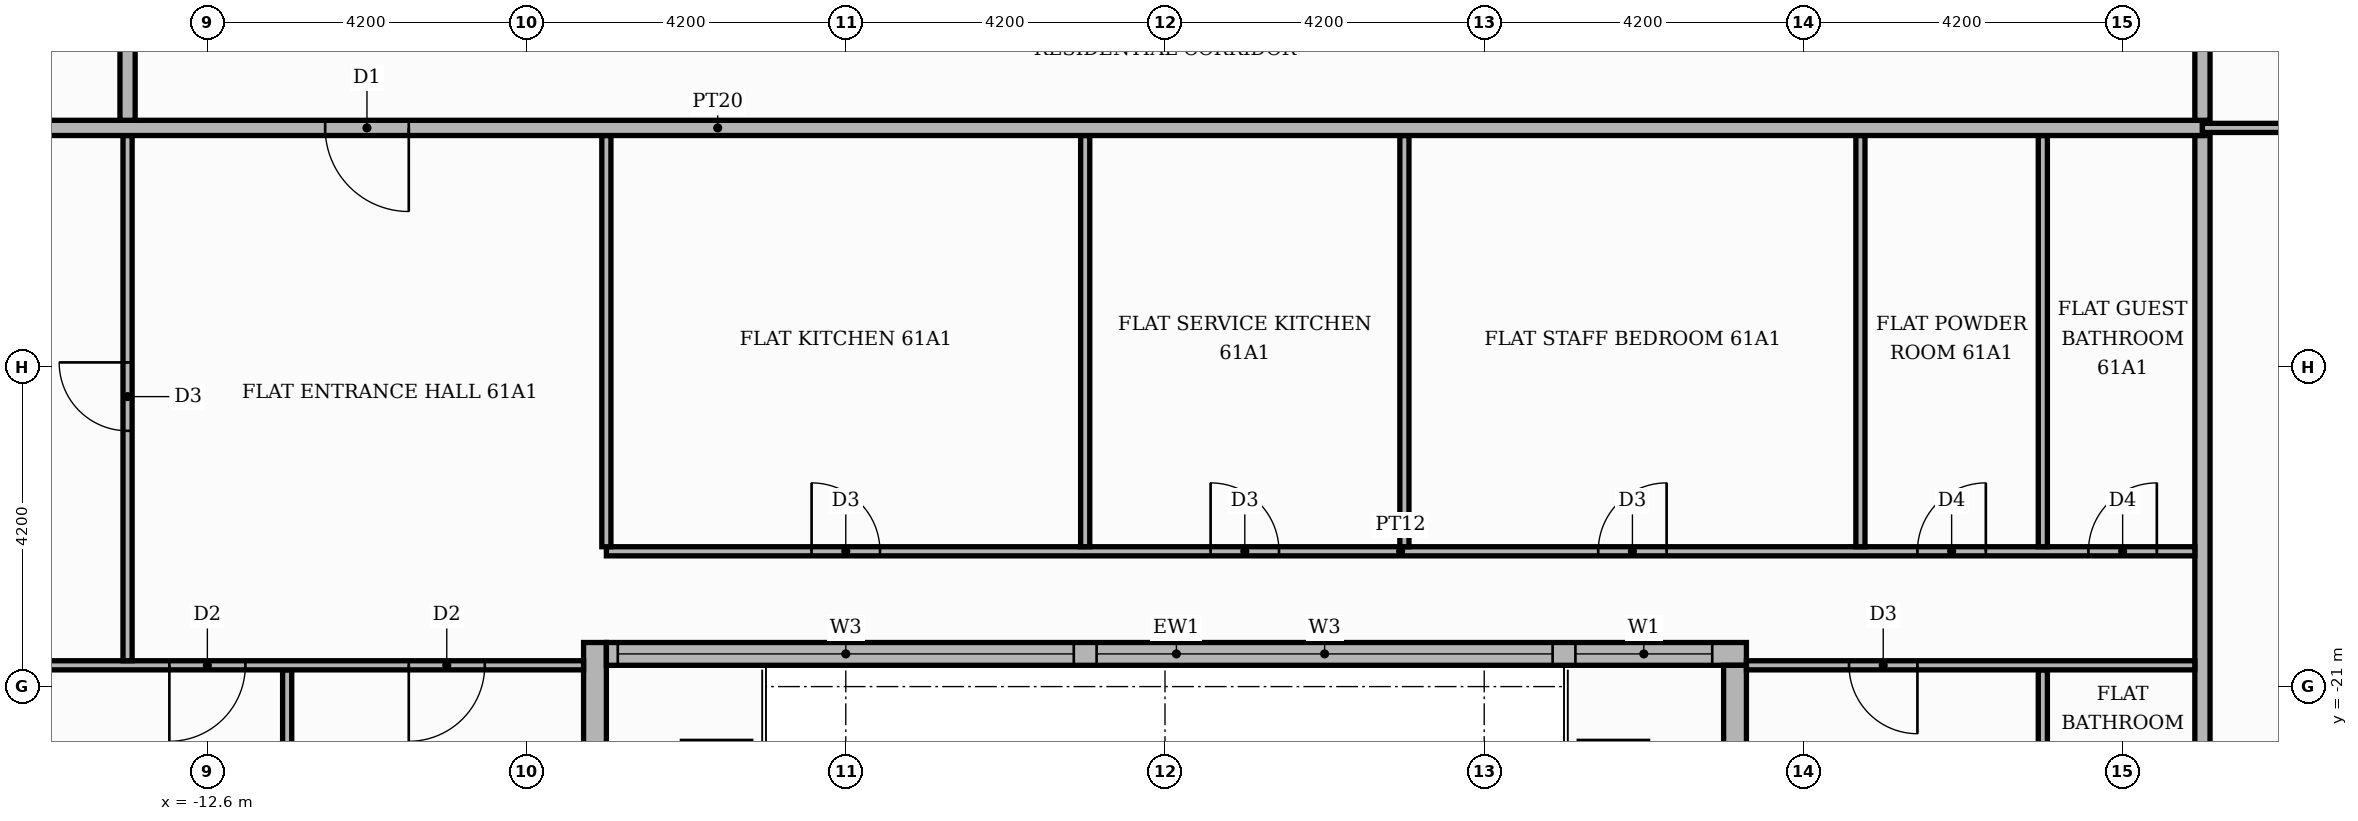
"""IFC4 building model, lengths in metres.
Left out: names, types, materials, properties, quantities, classifications, styles, units other than length and angle.
Written with IfcOpenShell. Run it as: python <this file> out.ifc"""

import sys

from ifc_helpers import new_model, si_unit, direction, frame, frame_2d, origin, place, context, subcontext, project, spatial, rectangle, extrude, element, fill, save


model = new_model("IFC4")
c1 = context("Model", 3, precision=1e-05, world=origin(), true_north=direction((0.0, 1.0)))
c2 = subcontext(c1, "Body", "Model", "MODEL_VIEW")
j1 = project(units=[si_unit("LENGTHUNIT", "METRE"), si_unit("PLANEANGLEUNIT", "RADIAN")], contexts=[c1])
p1 = place(None, origin())
s1 = spatial("IfcSite", under=j1, at=p1, CompositionType="ELEMENT")
p2 = place(p1, origin())
s2 = spatial("IfcBuilding", under=s1, at=p2, CompositionType="ELEMENT")
p3 = place(p2, frame((0.0, 0.0, 256.2)))
s3 = spatial("IfcBuildingStorey", under=s2, at=p3, CompositionType="ELEMENT", Elevation=256.2)
p4 = place(p3, frame((-7.5, -25.42, 0.0), z_axis=(0.0, 0.0, 1.0), x_axis=(0.0, 1.0, 0.0)))
e1 = element("IfcWall", 1, at=p4, inside=s3, PredefinedType="STANDARD", context=c2, shape_type="SweptSolid", body=[
    extrude(rectangle(XDim=5.0, YDim=0.3, at=frame_2d((2.5, 0.0))), origin(), (0.0, 0.0, 1.0), 3.48),
])
p5 = place(p4, frame((1.42, 0.0, 0.0)))
e2 = element("IfcOpeningElement", 2, at=p5, cuts=e1, PredefinedType="OPENING", context=c2, shape_type="SweptSolid", body=[
    extrude(rectangle(XDim=1.8, YDim=2.4, at=frame_2d((0.9, 1.2))), frame((0.0, 0.16, 0.0), z_axis=(0.0, -1.0, 0.0), x_axis=(1.0, 0.0, 0.0)), (0.0, 0.0, 1.0), 0.32),
])
p6 = place(p3, frame((-7.35, -20.57, 0.0), z_axis=(0.0, 0.0, 1.0), x_axis=(1.0, 0.0, 0.0)))
e3 = element("IfcWall", 3, at=p6, inside=s3, PredefinedType="STANDARD", context=c2, shape_type="SweptSolid", body=[
    extrude(rectangle(XDim=15.0, YDim=0.3, at=frame_2d((7.5, 0.0))), origin(), (0.0, 0.0, 1.0), 3.48),
])
p7 = place(p6, frame((0.15, 0.0, 0.9)))
e4 = element("IfcOpeningElement", 4, at=p7, cuts=e3, PredefinedType="OPENING", context=c2, shape_type="SweptSolid", body=[
    extrude(rectangle(XDim=6.0, YDim=2.1, at=frame_2d((3.0, 1.05))), frame((0.0, 0.16, 0.0), z_axis=(0.0, -1.0, 0.0), x_axis=(1.0, 0.0, 0.0)), (0.0, 0.0, 1.0), 0.32),
])
p8 = place(p6, frame((6.45, 0.0, 0.9)))
e5 = element("IfcOpeningElement", 5, at=p8, cuts=e3, PredefinedType="OPENING", context=c2, shape_type="SweptSolid", body=[
    extrude(rectangle(XDim=6.0, YDim=2.1, at=frame_2d((3.0, 1.05))), frame((0.0, 0.16, 0.0), z_axis=(0.0, -1.0, 0.0), x_axis=(1.0, 0.0, 0.0)), (0.0, 0.0, 1.0), 0.32),
])
p9 = place(p6, frame((12.75, 0.0, 0.9)))
e6 = element("IfcOpeningElement", 6, at=p9, cuts=e3, PredefinedType="OPENING", context=c2, shape_type="SweptSolid", body=[
    extrude(rectangle(XDim=1.8, YDim=2.1, at=frame_2d((0.9, 1.05))), frame((0.0, 0.16, 0.0), z_axis=(0.0, -1.0, 0.0), x_axis=(1.0, 0.0, 0.0)), (0.0, 0.0, 1.0), 0.32),
])
p10 = place(p3, frame((7.5, -20.72, 0.0), z_axis=(0.0, 0.0, 1.0), x_axis=(0.0, -1.0, 0.0)))
e7 = element("IfcWall", 7, at=p10, inside=s3, PredefinedType="STANDARD", context=c2, shape_type="SweptSolid", body=[
    extrude(rectangle(XDim=5.0, YDim=0.3, at=frame_2d((2.5, 0.0))), origin(), (0.0, 0.0, 1.0), 3.48),
])
p11 = place(p10, frame((1.48, 0.0, 0.0)))
e8 = element("IfcOpeningElement", 8, at=p11, cuts=e7, PredefinedType="OPENING", context=c2, shape_type="SweptSolid", body=[
    extrude(rectangle(XDim=1.8, YDim=2.4, at=frame_2d((0.9, 1.2))), frame((0.0, 0.16, 0.0), z_axis=(0.0, -1.0, 0.0), x_axis=(1.0, 0.0, 0.0)), (0.0, 0.0, 1.0), 0.32),
])
p12 = place(p3, frame((-11.55, -25.42, 0.0), z_axis=(0.0, 0.0, 1.0), x_axis=(0.0, 1.0, 0.0)))
e9 = element("IfcWall", 9, at=p12, inside=s3, PredefinedType="PARTITIONING", context=c2, shape_type="SweptSolid", body=[
    extrude(rectangle(XDim=4.64, YDim=0.12, at=frame_2d((2.32, 0.0))), origin(), (0.0, 0.0, 1.0), 3.48),
])
p13 = place(p3, frame((11.55, -25.42, 0.0), z_axis=(0.0, 0.0, 1.0), x_axis=(0.0, 1.0, 0.0)))
e10 = element("IfcWall", 10, at=p13, inside=s3, PredefinedType="PARTITIONING", context=c2, shape_type="SweptSolid", body=[
    extrude(rectangle(XDim=4.64, YDim=0.12, at=frame_2d((2.32, 0.0))), origin(), (0.0, 0.0, 1.0), 3.48),
])
p14 = place(p13, frame((1.75, 0.0, 0.0)))
e11 = element("IfcOpeningElement", 11, at=p14, cuts=e10, PredefinedType="OPENING", context=c2, shape_type="SweptSolid", body=[
    extrude(rectangle(XDim=0.9, YDim=2.1, at=frame_2d((0.45, 1.05))), frame((0.0, 0.07, 0.0), z_axis=(0.0, -1.0, 0.0), x_axis=(1.0, 0.0, 0.0)), (0.0, 0.0, 1.0), 0.14),
])
p15 = place(p3, frame((13.65, -25.42, 0.0), z_axis=(0.0, 0.0, 1.0), x_axis=(0.0, 1.0, 0.0)))
e12 = element("IfcWall", 12, at=p15, inside=s3, PredefinedType="PARTITIONING", context=c2, shape_type="SweptSolid", body=[
    extrude(rectangle(XDim=11.67, YDim=0.2, at=frame_2d((5.835, 0.0))), origin(), (0.0, 0.0, 1.0), 3.48),
])
p16 = place(p3, frame((-20.42, -20.72, 0.0), z_axis=(0.0, 0.0, 1.0), x_axis=(1.0, 0.0, 0.0)))
e13 = element("IfcWall", 13, at=p16, inside=s3, PredefinedType="PARTITIONING", context=c2, shape_type="SweptSolid", body=[
    extrude(rectangle(XDim=12.77, YDim=0.12, at=frame_2d((6.385, 0.0))), origin(), (0.0, 0.0, 1.0), 3.48),
])
p17 = place(p16, frame((7.32, 0.0, 0.0)))
e14 = element("IfcOpeningElement", 14, at=p17, cuts=e13, PredefinedType="OPENING", context=c2, shape_type="SweptSolid", body=[
    extrude(rectangle(XDim=1.0, YDim=2.1, at=frame_2d((0.5, 1.05))), frame((0.0, 0.07, 0.0), z_axis=(0.0, -1.0, 0.0), x_axis=(1.0, 0.0, 0.0)), (0.0, 0.0, 1.0), 0.14),
])
p18 = place(p16, frame((10.47, 0.0, 0.0)))
e15 = element("IfcOpeningElement", 15, at=p18, cuts=e13, PredefinedType="OPENING", context=c2, shape_type="SweptSolid", body=[
    extrude(rectangle(XDim=1.0, YDim=2.1, at=frame_2d((0.5, 1.05))), frame((0.0, 0.07, 0.0), z_axis=(0.0, -1.0, 0.0), x_axis=(1.0, 0.0, 0.0)), (0.0, 0.0, 1.0), 0.14),
])
p19 = place(p3, frame((7.65, -20.72, 0.0), z_axis=(0.0, 0.0, 1.0), x_axis=(1.0, 0.0, 0.0)))
e16 = element("IfcWall", 16, at=p19, inside=s3, PredefinedType="PARTITIONING", context=c2, shape_type="SweptSolid", body=[
    extrude(rectangle(XDim=5.9, YDim=0.12, at=frame_2d((2.95, 0.0))), origin(), (0.0, 0.0, 1.0), 3.48),
])
p20 = place(p19, frame((1.35, 0.0, 0.0)))
e17 = element("IfcOpeningElement", 17, at=p20, cuts=e16, PredefinedType="OPENING", context=c2, shape_type="SweptSolid", body=[
    extrude(rectangle(XDim=0.9, YDim=2.1, at=frame_2d((0.45, 1.05))), frame((0.0, 0.07, 0.0), z_axis=(0.0, -1.0, 0.0), x_axis=(1.0, 0.0, 0.0)), (0.0, 0.0, 1.0), 0.14),
])
p21 = place(p3, frame((-13.65, -20.66, 0.0), z_axis=(0.0, 0.0, 1.0), x_axis=(0.0, 1.0, 0.0)))
e18 = element("IfcWall", 18, at=p21, inside=s3, PredefinedType="PARTITIONING", context=c2, shape_type="SweptSolid", body=[
    extrude(rectangle(XDim=6.91, YDim=0.12, at=frame_2d((3.455, 0.0))), origin(), (0.0, 0.0, 1.0), 3.48),
])
p22 = place(p21, frame((3.025, 0.0, 0.0)))
e19 = element("IfcOpeningElement", 19, at=p22, cuts=e18, PredefinedType="OPENING", context=c2, shape_type="SweptSolid", body=[
    extrude(rectangle(XDim=0.9, YDim=2.1, at=frame_2d((0.45, 1.05))), frame((0.0, 0.07, 0.0), z_axis=(0.0, -1.0, 0.0), x_axis=(1.0, 0.0, 0.0)), (0.0, 0.0, 1.0), 0.14),
])
p23 = place(p3, frame((-7.35, -19.22, 0.0), z_axis=(0.0, 0.0, 1.0), x_axis=(1.0, 0.0, 0.0)))
e20 = element("IfcWall", 20, at=p23, inside=s3, PredefinedType="PARTITIONING", context=c2, shape_type="SweptSolid", body=[
    extrude(rectangle(XDim=20.9, YDim=0.12, at=frame_2d((10.45, 0.0))), origin(), (0.0, 0.0, 1.0), 3.48),
])
p24 = place(p23, frame((2.7, 0.0, 0.0)))
e21 = element("IfcOpeningElement", 21, at=p24, cuts=e20, PredefinedType="OPENING", context=c2, shape_type="SweptSolid", body=[
    extrude(rectangle(XDim=0.9, YDim=2.1, at=frame_2d((0.45, 1.05))), frame((0.0, 0.07, 0.0), z_axis=(0.0, -1.0, 0.0), x_axis=(1.0, 0.0, 0.0)), (0.0, 0.0, 1.0), 0.14),
])
p25 = place(p23, frame((7.95, 0.0, 0.0)))
e22 = element("IfcOpeningElement", 22, at=p25, cuts=e20, PredefinedType="OPENING", context=c2, shape_type="SweptSolid", body=[
    extrude(rectangle(XDim=0.9, YDim=2.1, at=frame_2d((0.45, 1.05))), frame((0.0, 0.07, 0.0), z_axis=(0.0, -1.0, 0.0), x_axis=(1.0, 0.0, 0.0)), (0.0, 0.0, 1.0), 0.14),
])
p26 = place(p23, frame((13.05, 0.0, 0.0)))
e23 = element("IfcOpeningElement", 23, at=p26, cuts=e20, PredefinedType="OPENING", context=c2, shape_type="SweptSolid", body=[
    extrude(rectangle(XDim=0.9, YDim=2.1, at=frame_2d((0.45, 1.05))), frame((0.0, 0.07, 0.0), z_axis=(0.0, -1.0, 0.0), x_axis=(1.0, 0.0, 0.0)), (0.0, 0.0, 1.0), 0.14),
])
p27 = place(p23, frame((17.25, 0.0, 0.0)))
e24 = element("IfcOpeningElement", 24, at=p27, cuts=e20, PredefinedType="OPENING", context=c2, shape_type="SweptSolid", body=[
    extrude(rectangle(XDim=0.9, YDim=2.1, at=frame_2d((0.45, 1.05))), frame((0.0, 0.07, 0.0), z_axis=(0.0, -1.0, 0.0), x_axis=(1.0, 0.0, 0.0)), (0.0, 0.0, 1.0), 0.14),
])
p28 = place(p23, frame((19.5, 0.0, 0.0)))
e25 = element("IfcOpeningElement", 25, at=p28, cuts=e20, PredefinedType="OPENING", context=c2, shape_type="SweptSolid", body=[
    extrude(rectangle(XDim=0.9, YDim=2.1, at=frame_2d((0.45, 1.05))), frame((0.0, 0.07, 0.0), z_axis=(0.0, -1.0, 0.0), x_axis=(1.0, 0.0, 0.0)), (0.0, 0.0, 1.0), 0.14),
])
for number, where, z_axis, x_axis in (
    (26, (-7.35, -19.16, 0.0), (0.0, 0.0, 1.0), (0.0, 1.0, 0.0)),
    (27, (-1.05, -19.16, 0.0), (0.0, 0.0, 1.0), (0.0, 1.0, 0.0)),
    (28, (3.15, -19.16, 0.0), (0.0, 0.0, 1.0), (0.0, 1.0, 0.0)),
    (29, (9.15, -19.16, 0.0), (0.0, 0.0, 1.0), (0.0, 1.0, 0.0)),
    (30, (11.55, -19.16, 0.0), (0.0, 0.0, 1.0), (0.0, 1.0, 0.0)),
):
    element("IfcWall", number, at=place(p3, frame(where, z_axis=z_axis, x_axis=x_axis)), inside=s3, PredefinedType="PARTITIONING", context=c2, shape_type="SweptSolid", body=[
        extrude(rectangle(XDim=5.41, YDim=0.12, at=frame_2d((2.705, 0.0))), origin(), (0.0, 0.0, 1.0), 3.48),
    ])
p29 = place(p3, frame((-25.42, -13.65, 0.0), z_axis=(0.0, 0.0, 1.0), x_axis=(1.0, 0.0, 0.0)))
e31 = element("IfcWall", 31, at=p29, inside=s3, PredefinedType="PARTITIONING", context=c2, shape_type="SweptSolid", body=[
    extrude(rectangle(XDim=39.07, YDim=0.2, at=frame_2d((19.535, 0.0))), origin(), (0.0, 0.0, 1.0), 3.48),
])
p30 = place(p29, frame((14.37, 0.0, 0.0)))
e32 = element("IfcOpeningElement", 32, at=p30, cuts=e31, PredefinedType="OPENING", context=c2, shape_type="SweptSolid", body=[
    extrude(rectangle(XDim=1.1, YDim=2.4, at=frame_2d((0.55, 1.2))), frame((0.0, 0.11, 0.0), z_axis=(0.0, -1.0, 0.0), x_axis=(1.0, 0.0, 0.0)), (0.0, 0.0, 1.0), 0.22),
])
p31 = place(p3, frame((13.65, -13.65, 0.0), z_axis=(0.0, 0.0, 1.0), x_axis=(1.0, 0.0, 0.0)))
e33 = element("IfcWall", 33, at=p31, inside=s3, PredefinedType="PARTITIONING", context=c2, shape_type="SweptSolid", body=[
    extrude(rectangle(XDim=6.47, YDim=0.12, at=frame_2d((3.235, 0.0))), origin(), (0.0, 0.0, 1.0), 3.48),
])
p32 = place(p31, frame((2.785, 0.0, 0.0)))
e34 = element("IfcOpeningElement", 34, at=p32, cuts=e33, PredefinedType="OPENING", context=c2, shape_type="SweptSolid", body=[
    extrude(rectangle(XDim=0.9, YDim=2.1, at=frame_2d((0.45, 1.05))), frame((0.0, 0.07, 0.0), z_axis=(0.0, -1.0, 0.0), x_axis=(1.0, 0.0, 0.0)), (0.0, 0.0, 1.0), 0.14),
])
for number, where, z_axis, x_axis in (
    (35, (-13.65, -13.55, 0.0), (0.0, 0.0, 1.0), (0.0, 1.0, 0.0)),
    (36, (13.65, -13.55, 0.0), (0.0, 0.0, 1.0), (0.0, 1.0, 0.0)),
):
    element("IfcWall", number, at=place(p3, frame(where, z_axis=z_axis, x_axis=x_axis)), inside=s3, PredefinedType="PARTITIONING", context=c2, shape_type="SweptSolid", body=[
        extrude(rectangle(XDim=2.45, YDim=0.2, at=frame_2d((1.225, 0.0))), origin(), (0.0, 0.0, 1.0), 3.48),
    ])
p33 = place(p7, origin())
e37 = element("IfcWindow", 37, at=p33, inside=s3, PartitioningType="SINGLE_PANEL", PredefinedType="WINDOW", context=c2, shape_type="SweptSolid", body=[
    extrude(rectangle(XDim=6.0, YDim=2.1, at=frame_2d((3.0, 1.05))), frame((0.0, 0.03, 0.0), z_axis=(0.0, -1.0, 0.0), x_axis=(1.0, 0.0, 0.0)), (0.0, 0.0, 1.0), 0.06),
])
fill(e4, e37)
p34 = place(p8, origin())
e38 = element("IfcWindow", 38, at=p34, inside=s3, PartitioningType="SINGLE_PANEL", PredefinedType="WINDOW", context=c2, shape_type="SweptSolid", body=[
    extrude(rectangle(XDim=6.0, YDim=2.1, at=frame_2d((3.0, 1.05))), frame((0.0, 0.03, 0.0), z_axis=(0.0, -1.0, 0.0), x_axis=(1.0, 0.0, 0.0)), (0.0, 0.0, 1.0), 0.06),
])
fill(e5, e38)
p35 = place(p9, origin())
e39 = element("IfcWindow", 39, at=p35, inside=s3, PartitioningType="SINGLE_PANEL", PredefinedType="WINDOW", context=c2, shape_type="SweptSolid", body=[
    extrude(rectangle(XDim=1.8, YDim=2.1, at=frame_2d((0.9, 1.05))), frame((0.0, 0.03, 0.0), z_axis=(0.0, -1.0, 0.0), x_axis=(1.0, 0.0, 0.0)), (0.0, 0.0, 1.0), 0.06),
])
fill(e6, e39)
p36 = place(p30, frame((1.1, 0.0, 0.0), z_axis=(0.0, 0.0, 1.0), x_axis=(-1.0, 0.0, 0.0)))
e40 = element("IfcDoor", 40, at=p36, inside=s3, OperationType="SINGLE_SWING_RIGHT", PredefinedType="DOOR", context=c2, shape_type="SweptSolid", body=[
    extrude(rectangle(XDim=1.1, YDim=2.4, at=frame_2d((0.55, 1.2))), frame((0.0, 0.025, 0.0), z_axis=(0.0, -1.0, 0.0), x_axis=(1.0, 0.0, 0.0)), (0.0, 0.0, 1.0), 0.05),
])
fill(e32, e40)
p37 = place(p22, origin())
e41 = element("IfcDoor", 41, at=p37, inside=s3, OperationType="SINGLE_SWING_RIGHT", PredefinedType="DOOR", context=c2, shape_type="SweptSolid", body=[
    extrude(rectangle(XDim=0.9, YDim=2.1, at=frame_2d((0.45, 1.05))), frame((0.0, 0.025, 0.0), z_axis=(0.0, -1.0, 0.0), x_axis=(1.0, 0.0, 0.0)), (0.0, 0.0, 1.0), 0.05),
])
fill(e19, e41)
p38 = place(p24, origin())
e42 = element("IfcDoor", 42, at=p38, inside=s3, OperationType="SINGLE_SWING_LEFT", PredefinedType="DOOR", context=c2, shape_type="SweptSolid", body=[
    extrude(rectangle(XDim=0.9, YDim=2.1, at=frame_2d((0.45, 1.05))), frame((0.0, 0.025, 0.0), z_axis=(0.0, -1.0, 0.0), x_axis=(1.0, 0.0, 0.0)), (0.0, 0.0, 1.0), 0.05),
])
fill(e21, e42)
p39 = place(p25, origin())
e43 = element("IfcDoor", 43, at=p39, inside=s3, OperationType="SINGLE_SWING_LEFT", PredefinedType="DOOR", context=c2, shape_type="SweptSolid", body=[
    extrude(rectangle(XDim=0.9, YDim=2.1, at=frame_2d((0.45, 1.05))), frame((0.0, 0.025, 0.0), z_axis=(0.0, -1.0, 0.0), x_axis=(1.0, 0.0, 0.0)), (0.0, 0.0, 1.0), 0.05),
])
fill(e22, e43)
p40 = place(p26, origin())
e44 = element("IfcDoor", 44, at=p40, inside=s3, OperationType="SINGLE_SWING_RIGHT", PredefinedType="DOOR", context=c2, shape_type="SweptSolid", body=[
    extrude(rectangle(XDim=0.9, YDim=2.1, at=frame_2d((0.45, 1.05))), frame((0.0, 0.025, 0.0), z_axis=(0.0, -1.0, 0.0), x_axis=(1.0, 0.0, 0.0)), (0.0, 0.0, 1.0), 0.05),
])
fill(e23, e44)
p41 = place(p27, origin())
e45 = element("IfcDoor", 45, at=p41, inside=s3, OperationType="SINGLE_SWING_RIGHT", PredefinedType="DOOR", context=c2, shape_type="SweptSolid", body=[
    extrude(rectangle(XDim=0.9, YDim=2.1, at=frame_2d((0.45, 1.05))), frame((0.0, 0.025, 0.0), z_axis=(0.0, -1.0, 0.0), x_axis=(1.0, 0.0, 0.0)), (0.0, 0.0, 1.0), 0.05),
])
fill(e24, e45)
p42 = place(p28, origin())
e46 = element("IfcDoor", 46, at=p42, inside=s3, OperationType="SINGLE_SWING_RIGHT", PredefinedType="DOOR", context=c2, shape_type="SweptSolid", body=[
    extrude(rectangle(XDim=0.9, YDim=2.1, at=frame_2d((0.45, 1.05))), frame((0.0, 0.025, 0.0), z_axis=(0.0, -1.0, 0.0), x_axis=(1.0, 0.0, 0.0)), (0.0, 0.0, 1.0), 0.05),
])
fill(e25, e46)
p43 = place(p17, frame((1.0, 0.0, 0.0), z_axis=(0.0, 0.0, 1.0), x_axis=(-1.0, 0.0, 0.0)))
e47 = element("IfcDoor", 47, at=p43, inside=s3, OperationType="SINGLE_SWING_LEFT", PredefinedType="DOOR", context=c2, shape_type="SweptSolid", body=[
    extrude(rectangle(XDim=1.0, YDim=2.1, at=frame_2d((0.5, 1.05))), frame((0.0, 0.025, 0.0), z_axis=(0.0, -1.0, 0.0), x_axis=(1.0, 0.0, 0.0)), (0.0, 0.0, 1.0), 0.05),
])
fill(e14, e47)
p44 = place(p18, frame((1.0, 0.0, 0.0), z_axis=(0.0, 0.0, 1.0), x_axis=(-1.0, 0.0, 0.0)))
e48 = element("IfcDoor", 48, at=p44, inside=s3, OperationType="SINGLE_SWING_LEFT", PredefinedType="DOOR", context=c2, shape_type="SweptSolid", body=[
    extrude(rectangle(XDim=1.0, YDim=2.1, at=frame_2d((0.5, 1.05))), frame((0.0, 0.025, 0.0), z_axis=(0.0, -1.0, 0.0), x_axis=(1.0, 0.0, 0.0)), (0.0, 0.0, 1.0), 0.05),
])
fill(e15, e48)
p45 = place(p20, frame((0.9, 0.0, 0.0), z_axis=(0.0, 0.0, 1.0), x_axis=(-1.0, 0.0, 0.0)))
e49 = element("IfcDoor", 49, at=p45, inside=s3, OperationType="SINGLE_SWING_RIGHT", PredefinedType="DOOR", context=c2, shape_type="SweptSolid", body=[
    extrude(rectangle(XDim=0.9, YDim=2.1, at=frame_2d((0.45, 1.05))), frame((0.0, 0.025, 0.0), z_axis=(0.0, -1.0, 0.0), x_axis=(1.0, 0.0, 0.0)), (0.0, 0.0, 1.0), 0.05),
])
fill(e17, e49)
save(model, sys.argv[1])
